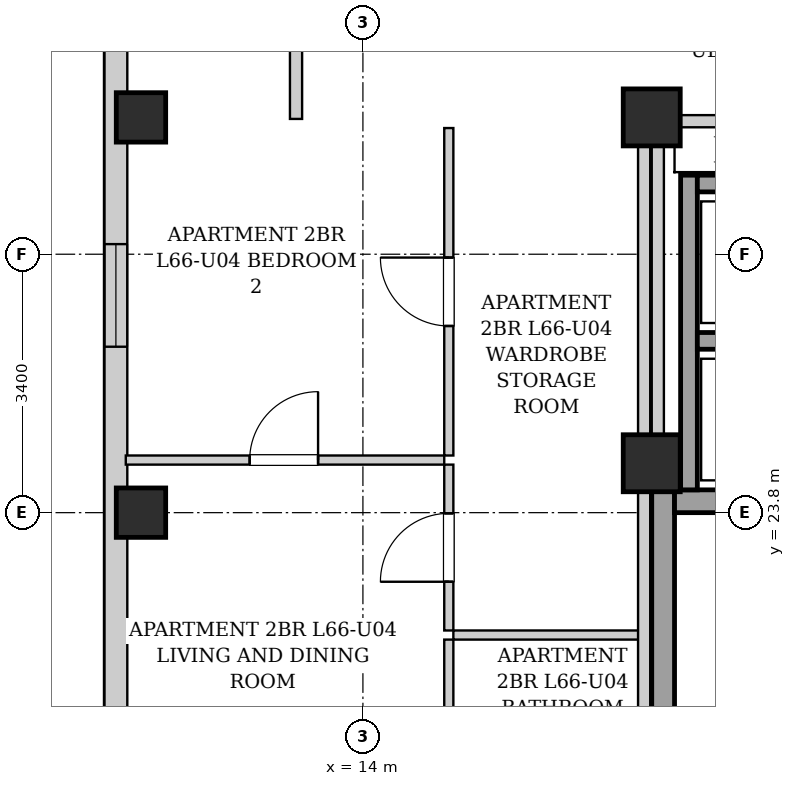
"""IFC4 building model, lengths in metres.
Left out: names, types, materials, properties, quantities, classifications, styles, units other than length and angle.
Written with IfcOpenShell. Run it as: python <this file> out.ifc"""

import sys

from ifc_helpers import new_model, si_unit, direction, frame, frame_2d, origin, origin_2d, place, context, subcontext, project, spatial, rectangle, extrude, element, fill, save


model = new_model("IFC4")
c1 = context("Model", 3, precision=1e-05, world=origin(), true_north=direction((0.0, 1.0)))
c2 = subcontext(c1, "Body", "Model", "MODEL_VIEW")
j1 = project(units=[si_unit("LENGTHUNIT", "METRE"), si_unit("PLANEANGLEUNIT", "RADIAN")], contexts=[c1])
p1 = place(None, origin())
s1 = spatial("IfcSite", under=j1, at=p1, CompositionType="ELEMENT")
p2 = place(p1, origin())
s2 = spatial("IfcBuilding", under=s1, at=p2, CompositionType="ELEMENT")
p3 = place(p2, frame((0.0, 0.0, 227.5)))
s3 = spatial("IfcBuildingStorey", under=s2, at=p3, CompositionType="ELEMENT", Elevation=227.5)
for number, where, z_axis, x_axis in (
    (1, (11.08, 23.8, 0.0), (0.0, 0.0, 1.0), (1.0, 0.0, 0.0)),
    (2, (11.08, 29.0, 0.0), (0.0, 0.0, 1.0), (1.0, 0.0, 0.0)),
):
    element("IfcColumn", number, at=place(p3, frame(where, z_axis=z_axis, x_axis=x_axis)), inside=s3, PredefinedType="COLUMN", context=c2, shape_type="SweptSolid", body=[
        extrude(rectangle(XDim=0.65, YDim=0.65, at=origin_2d()), origin(), (0.0, 0.0, 1.0), 3.4),
    ])
for number, where, z_axis, x_axis in (
    (3, (17.8, 29.0, 0.0), (0.0, 0.0, 1.0), (1.0, 0.0, 0.0)),
    (4, (17.8, 24.45, 0.0), (0.0, 0.0, 1.0), (1.0, 0.0, 0.0)),
):
    element("IfcColumn", number, at=place(p3, frame(where, z_axis=z_axis, x_axis=x_axis)), inside=s3, PredefinedType="COLUMN", context=c2, shape_type="SweptSolid", body=[
        extrude(rectangle(XDim=0.75, YDim=0.75, at=origin_2d()), origin(), (0.0, 0.0, 1.0), 3.4),
    ])
p4 = place(p3, frame((10.75, 6.3, 0.0), z_axis=(0.0, 0.0, 1.0), x_axis=(0.0, 1.0, 0.0)))
e5 = element("IfcWall", 5, at=p4, inside=s3, PredefinedType="SOLIDWALL", context=c2, shape_type="SweptSolid", body=[
    extrude(rectangle(XDim=31.4, YDim=0.3, at=frame_2d((15.7, 0.0))), origin(), (0.0, 0.0, 1.0), 3.14),
])
p5 = place(p4, frame((1.653, 0.0, 0.55)))
e6 = element("IfcOpeningElement", 6, at=p5, cuts=e5, PredefinedType="OPENING", context=c2, shape_type="SweptSolid", body=[
    extrude(rectangle(XDim=1.35, YDim=1.2, at=frame_2d((0.675, 0.6))), frame((0.0, 0.16, 0.0), z_axis=(0.0, -1.0, 0.0), x_axis=(1.0, 0.0, 0.0)), (0.0, 0.0, 1.0), 0.32),
])
p6 = place(p4, frame((10.367, 0.0, 0.55)))
e7 = element("IfcOpeningElement", 7, at=p6, cuts=e5, PredefinedType="OPENING", context=c2, shape_type="SweptSolid", body=[
    extrude(rectangle(XDim=1.35, YDim=1.2, at=frame_2d((0.675, 0.6))), frame((0.0, 0.16, 0.0), z_axis=(0.0, -1.0, 0.0), x_axis=(1.0, 0.0, 0.0)), (0.0, 0.0, 1.0), 0.32),
])
p7 = place(p4, frame((19.683, 0.0, 0.55)))
e8 = element("IfcOpeningElement", 8, at=p7, cuts=e5, PredefinedType="OPENING", context=c2, shape_type="SweptSolid", body=[
    extrude(rectangle(XDim=1.35, YDim=1.2, at=frame_2d((0.675, 0.6))), frame((0.0, 0.16, 0.0), z_axis=(0.0, -1.0, 0.0), x_axis=(1.0, 0.0, 0.0)), (0.0, 0.0, 1.0), 0.32),
])
p8 = place(p3, frame((17.95, 15.1, 0.0), z_axis=(0.0, 0.0, 1.0), x_axis=(0.0, 1.0, 0.0)))
e9 = element("IfcWall", 9, at=p8, inside=s3, PredefinedType="SHEAR", context=c2, shape_type="SweptSolid", body=[
    extrude(rectangle(XDim=9.0, YDim=0.3, at=frame_2d((4.5, 0.0))), origin(), (0.0, 0.0, 1.0), 3.14),
])
p9 = place(p3, frame((18.1, 23.95, 0.0), z_axis=(0.0, 0.0, 1.0), x_axis=(1.0, 0.0, 0.0)))
e10 = element("IfcWall", 10, at=p9, inside=s3, PredefinedType="SHEAR", context=c2, shape_type="SweptSolid", body=[
    extrude(rectangle(XDim=2.85, YDim=0.3, at=frame_2d((1.425, 0.0))), origin(), (0.0, 0.0, 1.0), 3.14),
])
p10 = place(p3, frame((18.29, 24.1, 0.0), z_axis=(0.0, 0.0, 1.0), x_axis=(0.0, 1.0, 0.0)))
e11 = element("IfcWall", 11, at=p10, inside=s3, PredefinedType="SHEAR", context=c2, shape_type="SweptSolid", body=[
    extrude(rectangle(XDim=4.14, YDim=0.22, at=frame_2d((2.07, 0.0))), origin(), (0.0, 0.0, 1.0), 3.14),
])
for number, where, z_axis, x_axis in (
    (12, (18.4, 26.06, 0.0), (0.0, 0.0, 1.0), (1.0, 0.0, 0.0)),
    (13, (18.4, 28.13, 0.0), (0.0, 0.0, 1.0), (1.0, 0.0, 0.0)),
):
    element("IfcWall", number, at=place(p3, frame(where, z_axis=z_axis, x_axis=x_axis)), inside=s3, PredefinedType="SHEAR", context=c2, shape_type="SweptSolid", body=[
        extrude(rectangle(XDim=1.9, YDim=0.22, at=frame_2d((0.95, 0.0))), origin(), (0.0, 0.0, 1.0), 3.14),
    ])
p11 = place(p3, frame((17.88, 24.12, 0.0), z_axis=(0.0, 0.0, 1.0), x_axis=(0.0, 1.0, 0.0)))
e14 = element("IfcWall", 14, at=p11, inside=s3, PredefinedType="PARTITIONING", context=c2, shape_type="SweptSolid", body=[
    extrude(rectangle(XDim=4.76, YDim=0.16, at=frame_2d((2.38, 0.0))), origin(), (0.0, 0.0, 1.0), 2.475),
])
p12 = place(p3, frame((17.96, 28.95, 0.0), z_axis=(0.0, 0.0, 1.0), x_axis=(1.0, 0.0, 0.0)))
e15 = element("IfcWall", 15, at=p12, inside=s3, PredefinedType="PARTITIONING", context=c2, shape_type="SweptSolid", body=[
    extrude(rectangle(XDim=4.29, YDim=0.16, at=frame_2d((2.145, 0.0))), origin(), (0.0, 0.0, 1.0), 2.668),
])
p13 = place(p12, frame((1.715, 0.0, 0.0)))
e16 = element("IfcOpeningElement", 16, at=p13, cuts=e15, PredefinedType="OPENING", context=c2, shape_type="SweptSolid", body=[
    extrude(rectangle(XDim=0.86, YDim=2.05, at=frame_2d((0.43, 1.025))), frame((0.0, 0.09, 0.0), z_axis=(0.0, -1.0, 0.0), x_axis=(1.0, 0.0, 0.0)), (0.0, 0.0, 1.0), 0.18),
])
p14 = place(p3, frame((13.12, 28.98, 0.0), z_axis=(0.0, 0.0, 1.0), x_axis=(0.0, 1.0, 0.0)))
e17 = element("IfcWall", 17, at=p14, inside=s3, PredefinedType="PARTITIONING", context=c2, shape_type="SweptSolid", body=[
    extrude(rectangle(XDim=1.58, YDim=0.16, at=frame_2d((0.79, 0.0))), origin(), (0.0, 0.0, 1.0), 3.14),
])
p15 = place(p3, frame((15.19, 22.19, 0.0), z_axis=(0.0, 0.0, 1.0), x_axis=(1.0, 0.0, 0.0)))
e18 = element("IfcWall", 18, at=p15, inside=s3, PredefinedType="PARTITIONING", context=c2, shape_type="SweptSolid", body=[
    extrude(rectangle(XDim=2.45, YDim=0.12, at=frame_2d((1.225, 0.0))), origin(), (0.0, 0.0, 1.0), 3.14),
])
p16 = place(p3, frame((15.13, 22.25, 0.0), z_axis=(0.0, 0.0, 1.0), x_axis=(0.0, 1.0, 0.0)))
e19 = element("IfcWall", 19, at=p16, inside=s3, PredefinedType="PARTITIONING", context=c2, shape_type="SweptSolid", body=[
    extrude(rectangle(XDim=2.182, YDim=0.12, at=frame_2d((1.091, 0.0))), origin(), (0.0, 0.0, 1.0), 3.14),
])
p17 = place(p16, frame((0.641, 0.0, 0.0)))
e20 = element("IfcOpeningElement", 20, at=p17, cuts=e19, PredefinedType="OPENING", context=c2, shape_type="SweptSolid", body=[
    extrude(rectangle(XDim=0.9, YDim=2.05, at=frame_2d((0.45, 1.025))), frame((0.0, 0.07, 0.0), z_axis=(0.0, -1.0, 0.0), x_axis=(1.0, 0.0, 0.0)), (0.0, 0.0, 1.0), 0.14),
])
p18 = place(p3, frame((15.13, 24.552, 0.0), z_axis=(0.0, 0.0, 1.0), x_axis=(0.0, 1.0, 0.0)))
e21 = element("IfcWall", 21, at=p18, inside=s3, PredefinedType="PARTITIONING", context=c2, shape_type="SweptSolid", body=[
    extrude(rectangle(XDim=4.308, YDim=0.12, at=frame_2d((2.154, 0.0))), origin(), (0.0, 0.0, 1.0), 3.14),
])
p19 = place(p18, frame((1.704, 0.0, 0.0)))
e22 = element("IfcOpeningElement", 22, at=p19, cuts=e21, PredefinedType="OPENING", context=c2, shape_type="SweptSolid", body=[
    extrude(rectangle(XDim=0.9, YDim=2.05, at=frame_2d((0.45, 1.025))), frame((0.0, 0.07, 0.0), z_axis=(0.0, -1.0, 0.0), x_axis=(1.0, 0.0, 0.0)), (0.0, 0.0, 1.0), 0.14),
])
p20 = place(p3, frame((15.13, 19.83, 0.0), z_axis=(0.0, 0.0, 1.0), x_axis=(0.0, 1.0, 0.0)))
e23 = element("IfcWall", 23, at=p20, inside=s3, PredefinedType="PARTITIONING", context=c2, shape_type="SweptSolid", body=[
    extrude(rectangle(XDim=2.3, YDim=0.12, at=frame_2d((1.15, 0.0))), origin(), (0.0, 0.0, 1.0), 3.14),
])
p21 = place(p3, frame((10.88, 24.492, 0.0), z_axis=(0.0, 0.0, 1.0), x_axis=(1.0, 0.0, 0.0)))
e24 = element("IfcWall", 24, at=p21, inside=s3, PredefinedType="PARTITIONING", context=c2, shape_type="SweptSolid", body=[
    extrude(rectangle(XDim=4.19, YDim=0.12, at=frame_2d((2.095, 0.0))), origin(), (0.0, 0.0, 1.0), 2.878),
])
p22 = place(p21, frame((1.63, 0.0, 0.0)))
e25 = element("IfcOpeningElement", 25, at=p22, cuts=e24, PredefinedType="OPENING", context=c2, shape_type="SweptSolid", body=[
    extrude(rectangle(XDim=0.9, YDim=2.05, at=frame_2d((0.45, 1.025))), frame((0.0, 0.07, 0.0), z_axis=(0.0, -1.0, 0.0), x_axis=(1.0, 0.0, 0.0)), (0.0, 0.0, 1.0), 0.14),
])
p23 = place(p3, frame((17.7, 15.02, 0.0), z_axis=(0.0, 0.0, 1.0), x_axis=(0.0, 1.0, 0.0)))
e26 = element("IfcWall", 26, at=p23, inside=s3, PredefinedType="PARTITIONING", context=c2, shape_type="SweptSolid", body=[
    extrude(rectangle(XDim=13.98, YDim=0.16, at=frame_2d((6.99, 0.0))), origin(), (0.0, 0.0, 1.0), 2.475),
])
p24 = place(p17, origin())
e27 = element("IfcDoor", 27, at=p24, inside=s3, OperationType="SINGLE_SWING_LEFT", PredefinedType="DOOR", context=c2, shape_type="SweptSolid", body=[
    extrude(rectangle(XDim=0.9, YDim=2.05, at=frame_2d((0.45, 1.025))), frame((0.0, 0.025, 0.0), z_axis=(0.0, -1.0, 0.0), x_axis=(1.0, 0.0, 0.0)), (0.0, 0.0, 1.0), 0.05),
])
fill(e20, e27)
p25 = place(p19, origin())
e28 = element("IfcDoor", 28, at=p25, inside=s3, OperationType="SINGLE_SWING_RIGHT", PredefinedType="DOOR", context=c2, shape_type="SweptSolid", body=[
    extrude(rectangle(XDim=0.9, YDim=2.05, at=frame_2d((0.45, 1.025))), frame((0.0, 0.025, 0.0), z_axis=(0.0, -1.0, 0.0), x_axis=(1.0, 0.0, 0.0)), (0.0, 0.0, 1.0), 0.05),
])
fill(e22, e28)
p26 = place(p22, origin())
e29 = element("IfcDoor", 29, at=p26, inside=s3, OperationType="SINGLE_SWING_RIGHT", PredefinedType="DOOR", context=c2, shape_type="SweptSolid", body=[
    extrude(rectangle(XDim=0.9, YDim=2.05, at=frame_2d((0.45, 1.025))), frame((0.0, 0.025, 0.0), z_axis=(0.0, -1.0, 0.0), x_axis=(1.0, 0.0, 0.0)), (0.0, 0.0, 1.0), 0.05),
])
fill(e25, e29)
p27 = place(p7, origin())
e30 = element("IfcWindow", 30, at=p27, inside=s3, PartitioningType="SINGLE_PANEL", PredefinedType="WINDOW", context=c2, shape_type="SweptSolid", body=[
    extrude(rectangle(XDim=1.35, YDim=1.2, at=frame_2d((0.675, 0.6))), frame((0.0, 0.03, 0.0), z_axis=(0.0, -1.0, 0.0), x_axis=(1.0, 0.0, 0.0)), (0.0, 0.0, 1.0), 0.06),
])
fill(e8, e30)
save(model, sys.argv[1])
